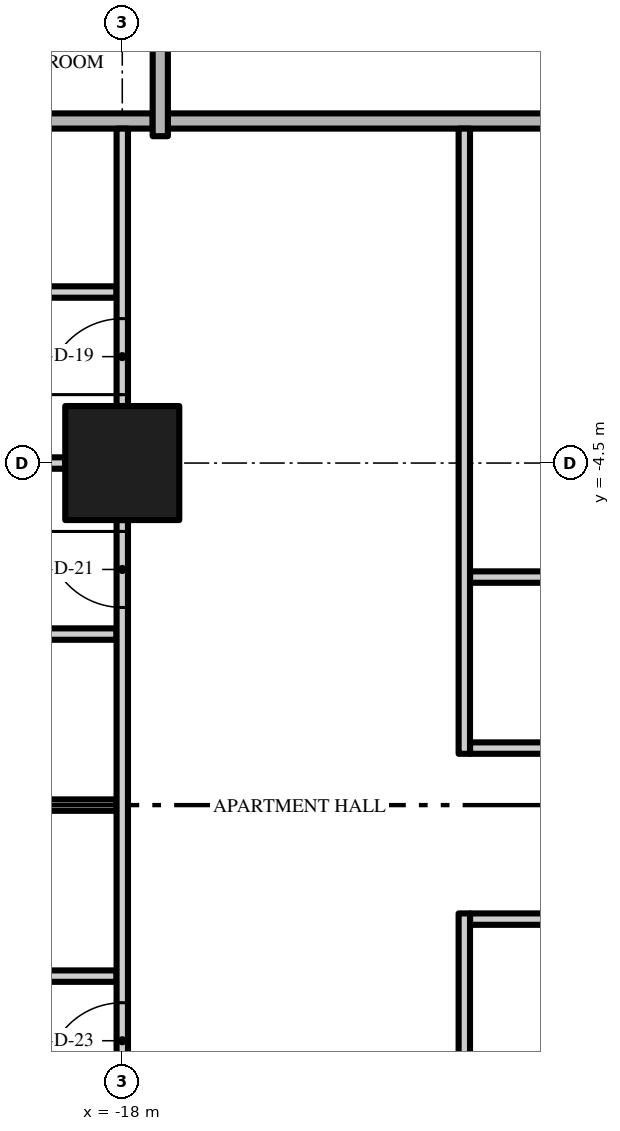
"""IFC4 building model, lengths in metres.
Left out: names, types, materials, properties, quantities, classifications, styles, units other than length and angle.
Written with IfcOpenShell. Run it as: python <this file> out.ifc"""

import sys

from ifc_helpers import new_model, si_unit, direction, frame, frame_2d, origin, origin_2d, place, context, subcontext, project, spatial, rectangle, extrude, element, fill, save


model = new_model("IFC4")
c1 = context("Model", 3, precision=1e-05, world=origin(), true_north=direction((0.0, 1.0)))
c2 = subcontext(c1, "Body", "Model", "MODEL_VIEW")
j1 = project(units=[si_unit("LENGTHUNIT", "METRE"), si_unit("PLANEANGLEUNIT", "RADIAN")], contexts=[c1])
p1 = place(None, origin())
s1 = spatial("IfcSite", under=j1, at=p1, CompositionType="ELEMENT")
p2 = place(p1, origin())
s2 = spatial("IfcBuilding", under=s1, at=p2, CompositionType="ELEMENT")
p3 = place(p2, frame((0.0, 0.0, 49.2)))
s3 = spatial("IfcBuildingStorey", under=s2, at=p3, CompositionType="ELEMENT", Elevation=49.2)
p4 = place(p3, frame((-18.0, -4.5, 0.0), z_axis=(0.0, 0.0, 1.0), x_axis=(1.0, 0.0, 0.0)))
e1 = element("IfcColumn", 1, at=p4, inside=s3, PredefinedType="COLUMN", context=c2, shape_type="SweptSolid", body=[
    extrude(rectangle(XDim=1.5, YDim=1.5, at=origin_2d()), origin(), (0.0, 0.0, 1.0), 3.5),
])
p5 = place(p3, frame((-20.925, -11.25, 0.0), z_axis=(0.0, 0.0, 1.0), x_axis=(1.0, 0.0, 0.0)))
e2 = element("IfcWall", 2, at=p5, inside=s3, PredefinedType="PARTITIONING", context=c2, shape_type="SweptSolid", body=[
    extrude(rectangle(XDim=2.85, YDim=0.15, at=frame_2d((1.425, 0.0))), origin(), (0.0, 0.0, 1.0), 3.5),
])
p6 = place(p3, frame((-13.425, -10.5, 0.0), z_axis=(0.0, 0.0, 1.0), x_axis=(1.0, 0.0, 0.0)))
e3 = element("IfcWall", 3, at=p6, inside=s3, PredefinedType="PARTITIONING", context=c2, shape_type="SweptSolid", body=[
    extrude(rectangle(XDim=4.35, YDim=0.15, at=frame_2d((2.175, 0.0))), origin(), (0.0, 0.0, 1.0), 3.5),
])
p7 = place(p3, frame((-20.925, -9.0, 0.0), z_axis=(0.0, 0.0, 1.0), x_axis=(1.0, 0.0, 0.0)))
e4 = element("IfcWall", 4, at=p7, inside=s3, PredefinedType="PARTITIONING", context=c2, shape_type="SweptSolid", body=[
    extrude(rectangle(XDim=2.85, YDim=0.15, at=frame_2d((1.425, 0.0))), origin(), (0.0, 0.0, 1.0), 3.5),
])
p8 = place(p3, frame((-13.425, -8.25, 0.0), z_axis=(0.0, 0.0, 1.0), x_axis=(1.0, 0.0, 0.0)))
e5 = element("IfcWall", 5, at=p8, inside=s3, PredefinedType="PARTITIONING", context=c2, shape_type="SweptSolid", body=[
    extrude(rectangle(XDim=4.35, YDim=0.15, at=frame_2d((2.175, 0.0))), origin(), (0.0, 0.0, 1.0), 3.5),
])
p9 = place(p8, frame((1.75, 0.0, 0.0)))
e6 = element("IfcOpeningElement", 6, at=p9, cuts=e5, PredefinedType="OPENING", context=c2, shape_type="SweptSolid", body=[
    extrude(rectangle(XDim=0.9, YDim=2.1, at=frame_2d((0.45, 1.05))), frame((0.0, 0.085, 0.0), z_axis=(0.0, -1.0, 0.0), x_axis=(1.0, 0.0, 0.0)), (0.0, 0.0, 1.0), 0.17),
])
p10 = place(p3, frame((-20.925, -6.75, 0.0), z_axis=(0.0, 0.0, 1.0), x_axis=(1.0, 0.0, 0.0)))
e7 = element("IfcWall", 7, at=p10, inside=s3, PredefinedType="PARTITIONING", context=c2, shape_type="SweptSolid", body=[
    extrude(rectangle(XDim=2.85, YDim=0.15, at=frame_2d((1.425, 0.0))), origin(), (0.0, 0.0, 1.0), 3.5),
])
p11 = place(p3, frame((-13.425, -6.0, 0.0), z_axis=(0.0, 0.0, 1.0), x_axis=(1.0, 0.0, 0.0)))
e8 = element("IfcWall", 8, at=p11, inside=s3, PredefinedType="PARTITIONING", context=c2, shape_type="SweptSolid", body=[
    extrude(rectangle(XDim=4.35, YDim=0.15, at=frame_2d((2.175, 0.0))), origin(), (0.0, 0.0, 1.0), 3.5),
])
p12 = place(p3, frame((-25.6, -4.5, 0.0), z_axis=(0.0, 0.0, 1.0), x_axis=(1.0, 0.0, 0.0)))
e9 = element("IfcWall", 9, at=p12, inside=s3, PredefinedType="PARTITIONING", context=c2, shape_type="SweptSolid", body=[
    extrude(rectangle(XDim=6.85, YDim=0.15, at=frame_2d((3.425, 0.0))), origin(), (0.0, 0.0, 1.0), 3.5),
])
p13 = place(p3, frame((-20.925, -2.25, 0.0), z_axis=(0.0, 0.0, 1.0), x_axis=(1.0, 0.0, 0.0)))
e10 = element("IfcWall", 10, at=p13, inside=s3, PredefinedType="PARTITIONING", context=c2, shape_type="SweptSolid", body=[
    extrude(rectangle(XDim=2.85, YDim=0.15, at=frame_2d((1.425, 0.0))), origin(), (0.0, 0.0, 1.0), 3.5),
])
p14 = place(p3, frame((-17.4, 0.0, 0.0), z_axis=(0.0, 0.0, 1.0), x_axis=(1.0, 0.0, 0.0)))
e11 = element("IfcWall", 11, at=p14, inside=s3, PredefinedType="PARTITIONING", context=c2, shape_type="SweptSolid", body=[
    extrude(rectangle(XDim=12.8, YDim=0.2, at=frame_2d((6.4, 0.0))), origin(), (0.0, 0.0, 1.0), 3.5),
])
p15 = place(p3, frame((-26.7, 0.0, 0.0), z_axis=(0.0, 0.0, 1.0), x_axis=(1.0, 0.0, 0.0)))
e12 = element("IfcWall", 12, at=p15, inside=s3, PredefinedType="PARTITIONING", context=c2, shape_type="SweptSolid", body=[
    extrude(rectangle(XDim=9.1, YDim=0.2, at=frame_2d((4.55, 0.0))), origin(), (0.0, 0.0, 1.0), 3.5),
])
p16 = place(p3, frame((-18.0, -12.75, 0.0), z_axis=(0.0, 0.0, 1.0), x_axis=(0.0, 1.0, 0.0)))
e13 = element("IfcWall", 13, at=p16, inside=s3, PredefinedType="PARTITIONING", context=c2, shape_type="SweptSolid", body=[
    extrude(rectangle(XDim=7.5, YDim=0.15, at=frame_2d((3.75, 0.0))), origin(), (0.0, 0.0, 1.0), 3.5),
])
p17 = place(p16, frame((6.35, 0.0, 0.0)))
e14 = element("IfcOpeningElement", 14, at=p17, cuts=e13, PredefinedType="OPENING", context=c2, shape_type="SweptSolid", body=[
    extrude(rectangle(XDim=1.0, YDim=2.4, at=frame_2d((0.5, 1.2))), frame((0.0, 0.085, 0.0), z_axis=(0.0, -1.0, 0.0), x_axis=(1.0, 0.0, 0.0)), (0.0, 0.0, 1.0), 0.17),
])
p18 = place(p16, frame((0.15, 0.0, 0.0)))
e15 = element("IfcOpeningElement", 15, at=p18, cuts=e13, PredefinedType="OPENING", context=c2, shape_type="SweptSolid", body=[
    extrude(rectangle(XDim=1.0, YDim=2.4, at=frame_2d((0.5, 1.2))), frame((0.0, 0.085, 0.0), z_axis=(0.0, -1.0, 0.0), x_axis=(1.0, 0.0, 0.0)), (0.0, 0.0, 1.0), 0.17),
])
p19 = place(p3, frame((-18.0, -3.75, 0.0), z_axis=(0.0, 0.0, 1.0), x_axis=(0.0, 1.0, 0.0)))
e16 = element("IfcWall", 16, at=p19, inside=s3, PredefinedType="PARTITIONING", context=c2, shape_type="SweptSolid", body=[
    extrude(rectangle(XDim=3.65, YDim=0.15, at=frame_2d((1.825, 0.0))), origin(), (0.0, 0.0, 1.0), 3.5),
])
p20 = place(p19, frame((0.15, 0.0, 0.0)))
e17 = element("IfcOpeningElement", 17, at=p20, cuts=e16, PredefinedType="OPENING", context=c2, shape_type="SweptSolid", body=[
    extrude(rectangle(XDim=1.0, YDim=2.4, at=frame_2d((0.5, 1.2))), frame((0.0, 0.085, 0.0), z_axis=(0.0, -1.0, 0.0), x_axis=(1.0, 0.0, 0.0)), (0.0, 0.0, 1.0), 0.17),
])
p21 = place(p3, frame((-17.5, -0.2, 0.0), z_axis=(0.0, 0.0, 1.0), x_axis=(0.0, 1.0, 0.0)))
e18 = element("IfcWall", 18, at=p21, inside=s3, PredefinedType="PARTITIONING", context=c2, shape_type="SweptSolid", body=[
    extrude(rectangle(XDim=3.95, YDim=0.2, at=frame_2d((1.975, 0.0))), origin(), (0.0, 0.0, 1.0), 3.5),
])
p22 = place(p3, frame((-13.5, -10.425, 0.0), z_axis=(0.0, 0.0, 1.0), x_axis=(0.0, -1.0, 0.0)))
e19 = element("IfcWall", 19, at=p22, inside=s3, PredefinedType="PARTITIONING", context=c2, shape_type="SweptSolid", body=[
    extrude(rectangle(XDim=11.775, YDim=0.15, at=frame_2d((5.888, 0.0))), origin(), (0.0, 0.0, 1.0), 3.5),
])
p23 = place(p22, frame((2.625, 0.0, 0.0)))
e20 = element("IfcOpeningElement", 20, at=p23, cuts=e19, PredefinedType="OPENING", context=c2, shape_type="SweptSolid", body=[
    extrude(rectangle(XDim=0.9, YDim=2.1, at=frame_2d((0.45, 1.05))), frame((0.0, 0.085, 0.0), z_axis=(0.0, -1.0, 0.0), x_axis=(1.0, 0.0, 0.0)), (0.0, 0.0, 1.0), 0.17),
])
p24 = place(p3, frame((-13.5, -8.325, 0.0), z_axis=(0.0, 0.0, 1.0), x_axis=(0.0, 1.0, 0.0)))
e21 = element("IfcWall", 21, at=p24, inside=s3, PredefinedType="PARTITIONING", context=c2, shape_type="SweptSolid", body=[
    extrude(rectangle(XDim=8.225, YDim=0.15, at=frame_2d((4.112, 0.0))), origin(), (0.0, 0.0, 1.0), 3.5),
])
p25 = place(p20, origin())
e22 = element("IfcDoor", 22, at=p25, inside=s3, OperationType="SINGLE_SWING_LEFT", PredefinedType="DOOR", context=c2, shape_type="SweptSolid", body=[
    extrude(rectangle(XDim=1.0, YDim=2.4, at=frame_2d((0.5, 1.2))), frame((0.0, 0.025, 0.0), z_axis=(0.0, -1.0, 0.0), x_axis=(1.0, 0.0, 0.0)), (0.0, 0.0, 1.0), 0.05),
])
fill(e17, e22)
p26 = place(p17, origin())
e23 = element("IfcDoor", 23, at=p26, inside=s3, OperationType="SINGLE_SWING_RIGHT", PredefinedType="DOOR", context=c2, shape_type="SweptSolid", body=[
    extrude(rectangle(XDim=1.0, YDim=2.4, at=frame_2d((0.5, 1.2))), frame((0.0, 0.025, 0.0), z_axis=(0.0, -1.0, 0.0), x_axis=(1.0, 0.0, 0.0)), (0.0, 0.0, 1.0), 0.05),
])
fill(e14, e23)
p27 = place(p18, origin())
e24 = element("IfcDoor", 24, at=p27, inside=s3, OperationType="SINGLE_SWING_LEFT", PredefinedType="DOOR", context=c2, shape_type="SweptSolid", body=[
    extrude(rectangle(XDim=1.0, YDim=2.4, at=frame_2d((0.5, 1.2))), frame((0.0, 0.025, 0.0), z_axis=(0.0, -1.0, 0.0), x_axis=(1.0, 0.0, 0.0)), (0.0, 0.0, 1.0), 0.05),
])
fill(e15, e24)
save(model, sys.argv[1])
